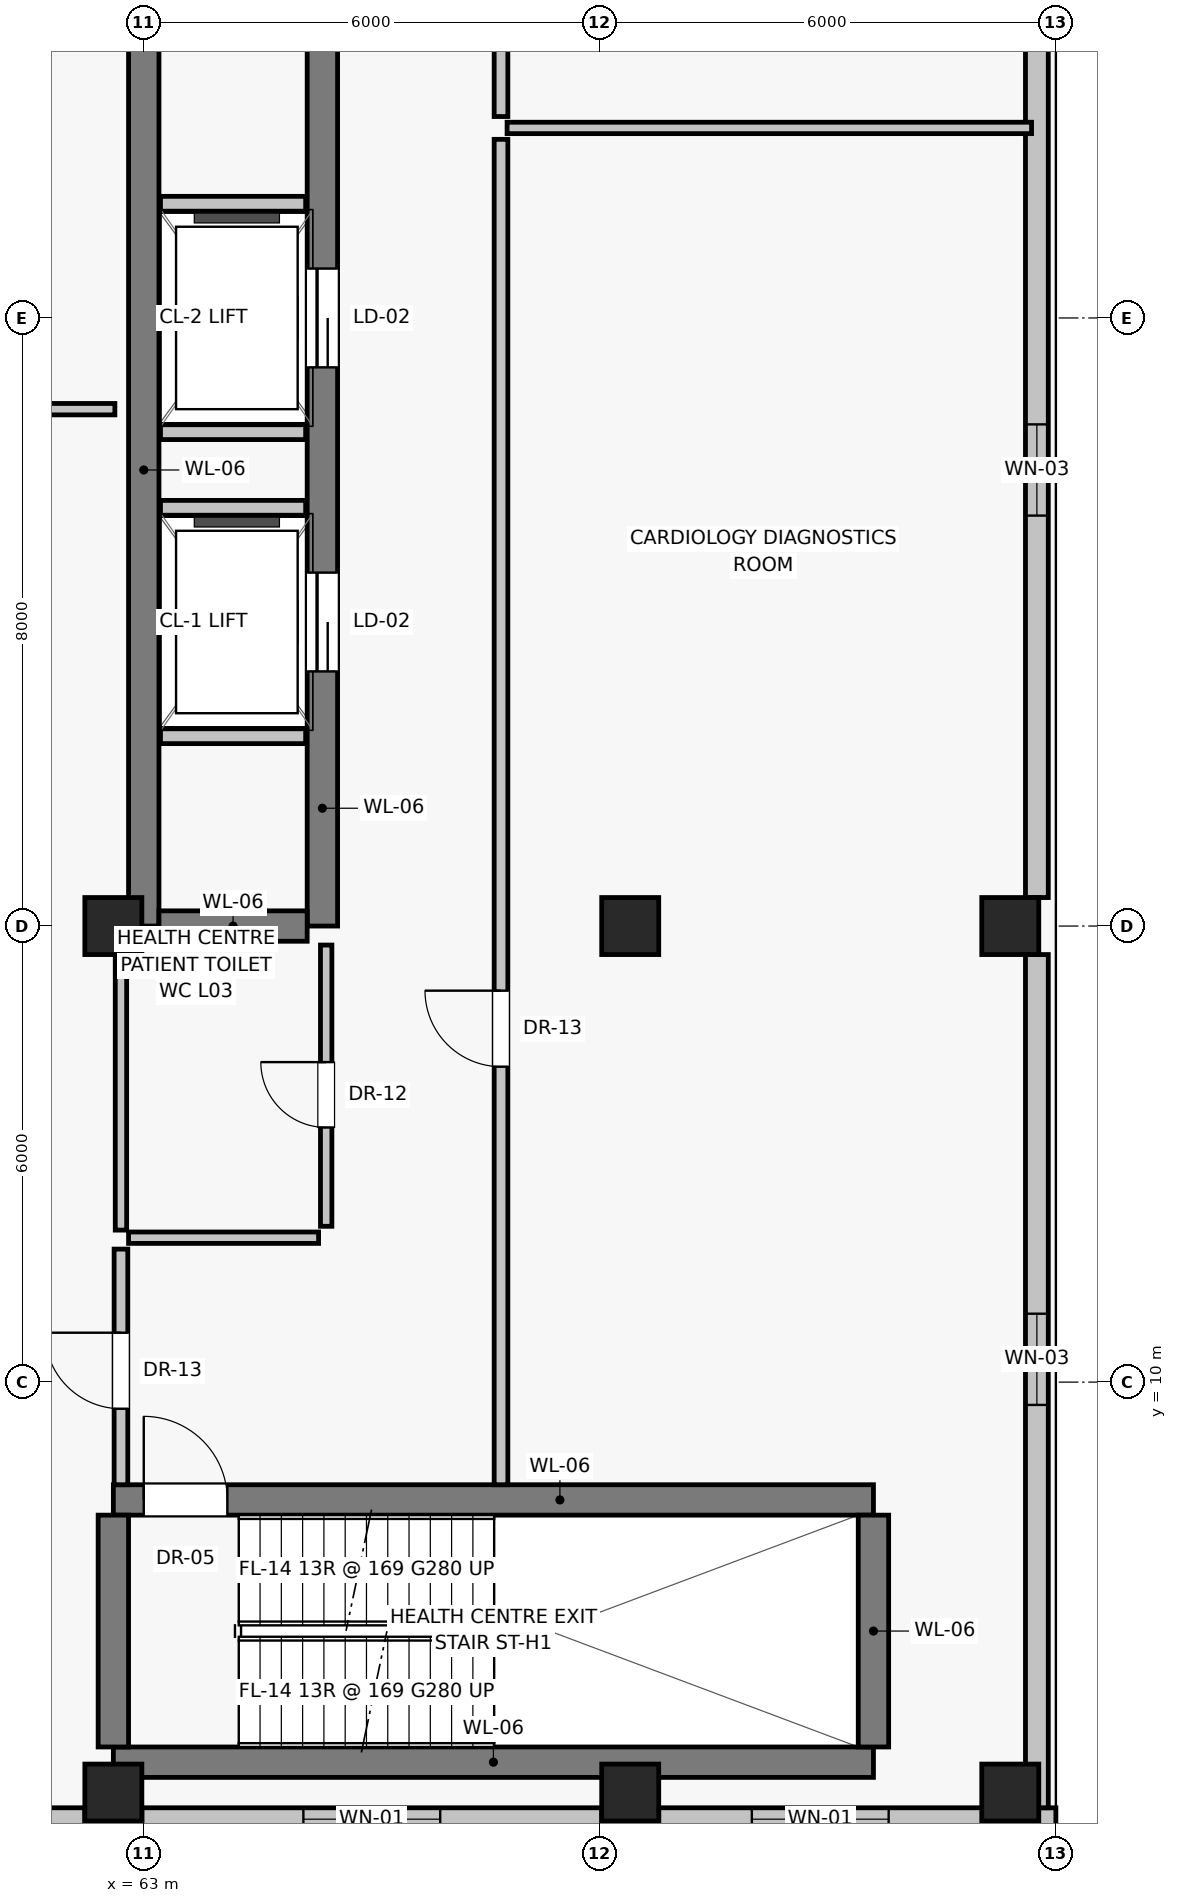
"""IFC4 building model, lengths in metres.
Left out: names, types, materials, properties, quantities, classifications, styles, units other than length and angle.
Written with IfcOpenShell. Run it as: python <this file> out.ifc"""

import sys

from ifc_helpers import new_model, si_unit, direction, frame, frame_2d, origin, origin_2d, place, context, subcontext, project, spatial, rectangle, extrude, source, transform, mapped, element, fill, save


model = new_model("IFC4")
c1 = context("Model", 3, precision=1e-05, world=origin(), true_north=direction((0.0, 1.0)))
c2 = subcontext(c1, "Body", "Model", "MODEL_VIEW")
j1 = project(units=[si_unit("LENGTHUNIT", "METRE"), si_unit("PLANEANGLEUNIT", "RADIAN")], contexts=[c1])
p1 = place(None, origin())
s1 = spatial("IfcSite", under=j1, at=p1, CompositionType="ELEMENT")
p2 = place(p1, origin())
s2 = spatial("IfcBuilding", under=s1, at=p2, CompositionType="ELEMENT")
p3 = place(p2, frame((0.0, 0.0, 14.0)))
s3 = spatial("IfcBuildingStorey", under=s2, at=p3, CompositionType="ELEMENT", Elevation=14.0)
for number, where, z_axis, x_axis in (
    (1, (62.6, 4.6, 0.0), (0.0, 0.0, 1.0), (1.0, 0.0, 0.0)),
    (2, (62.6, 16.0, 0.0), (0.0, 0.0, 1.0), (1.0, 0.0, 0.0)),
    (3, (69.4, 4.6, 0.0), (0.0, 0.0, 1.0), (1.0, 0.0, 0.0)),
    (4, (69.4, 16.0, 0.0), (0.0, 0.0, 1.0), (1.0, 0.0, 0.0)),
    (5, (74.4, 4.6, 0.0), (0.0, 0.0, 1.0), (1.0, 0.0, 0.0)),
    (6, (74.4, 16.0, 0.0), (0.0, 0.0, 1.0), (1.0, 0.0, 0.0)),
):
    element("IfcColumn", number, at=place(p3, frame(where, z_axis=z_axis, x_axis=x_axis)), inside=s3, PredefinedType="COLUMN", context=c2, shape_type="SweptSolid", body=[
        extrude(rectangle(XDim=0.75, YDim=0.75, at=origin_2d()), origin(), (0.0, 0.0, 1.0), 4.4),
    ])
p4 = place(p3, frame((57.0, 4.25, 0.0), z_axis=(0.0, 0.0, 1.0), x_axis=(1.0, 0.0, 0.0)))
e7 = element("IfcWall", 7, at=p4, inside=s3, PredefinedType="SOLIDWALL", context=c2, shape_type="SweptSolid", body=[
    extrude(rectangle(XDim=5.225, YDim=0.3, at=frame_2d((2.613, 0.0))), origin(), (0.0, 0.0, 1.0), 3.35),
])
p5 = place(p4, frame((2.2, 0.0, 0.85)))
e8 = element("IfcOpeningElement", 8, at=p5, cuts=e7, PredefinedType="OPENING", context=c2, shape_type="SweptSolid", body=[
    extrude(rectangle(XDim=1.8, YDim=1.65, at=frame_2d((0.9, 0.825))), frame((0.0, 0.16, 0.0), z_axis=(0.0, -1.0, 0.0), x_axis=(1.0, 0.0, 0.0)), (0.0, 0.0, 1.0), 0.32),
])
p6 = place(p3, frame((62.975, 4.25, 0.0), z_axis=(0.0, 0.0, 1.0), x_axis=(1.0, 0.0, 0.0)))
e9 = element("IfcWall", 9, at=p6, inside=s3, PredefinedType="SOLIDWALL", context=c2, shape_type="SweptSolid", body=[
    extrude(rectangle(XDim=6.05, YDim=0.3, at=frame_2d((3.025, 0.0))), origin(), (0.0, 0.0, 1.0), 3.35),
])
p7 = place(p6, frame((2.125, 0.0, 0.85)))
e10 = element("IfcOpeningElement", 10, at=p7, cuts=e9, PredefinedType="OPENING", context=c2, shape_type="SweptSolid", body=[
    extrude(rectangle(XDim=1.8, YDim=1.65, at=frame_2d((0.9, 0.825))), frame((0.0, 0.16, 0.0), z_axis=(0.0, -1.0, 0.0), x_axis=(1.0, 0.0, 0.0)), (0.0, 0.0, 1.0), 0.32),
])
p8 = place(p3, frame((69.775, 4.25, 0.0), z_axis=(0.0, 0.0, 1.0), x_axis=(1.0, 0.0, 0.0)))
e11 = element("IfcWall", 11, at=p8, inside=s3, PredefinedType="SOLIDWALL", context=c2, shape_type="SweptSolid", body=[
    extrude(rectangle(XDim=5.225, YDim=0.3, at=frame_2d((2.613, 0.0))), origin(), (0.0, 0.0, 1.0), 3.35),
])
p9 = place(p8, frame((1.225, 0.0, 0.85)))
e12 = element("IfcOpeningElement", 12, at=p9, cuts=e11, PredefinedType="OPENING", context=c2, shape_type="SweptSolid", body=[
    extrude(rectangle(XDim=1.8, YDim=1.65, at=frame_2d((0.9, 0.825))), frame((0.0, 0.16, 0.0), z_axis=(0.0, -1.0, 0.0), x_axis=(1.0, 0.0, 0.0)), (0.0, 0.0, 1.0), 0.32),
])
p10 = place(p3, frame((74.75, 4.4, 0.0), z_axis=(0.0, 0.0, 1.0), x_axis=(0.0, 1.0, 0.0)))
e13 = element("IfcWall", 13, at=p10, inside=s3, PredefinedType="SOLIDWALL", context=c2, shape_type="SweptSolid", body=[
    extrude(rectangle(XDim=11.225, YDim=0.3, at=frame_2d((5.613, 0.0))), origin(), (0.0, 0.0, 1.0), 3.35),
])
p11 = place(p10, frame((5.3, 0.0, 0.95)))
e14 = element("IfcOpeningElement", 14, at=p11, cuts=e13, PredefinedType="OPENING", context=c2, shape_type="SweptSolid", body=[
    extrude(rectangle(XDim=1.2, YDim=1.5, at=frame_2d((0.6, 0.75))), frame((0.0, 0.16, 0.0), z_axis=(0.0, -1.0, 0.0), x_axis=(1.0, 0.0, 0.0)), (0.0, 0.0, 1.0), 0.32),
])
p12 = place(p3, frame((74.75, 16.375, 0.0), z_axis=(0.0, 0.0, 1.0), x_axis=(0.0, 1.0, 0.0)))
e15 = element("IfcWall", 15, at=p12, inside=s3, PredefinedType="SOLIDWALL", context=c2, shape_type="SweptSolid", body=[
    extrude(rectangle(XDim=11.25, YDim=0.3, at=frame_2d((5.625, 0.0))), origin(), (0.0, 0.0, 1.0), 3.35),
])
p13 = place(p12, frame((5.025, 0.0, 0.95)))
e16 = element("IfcOpeningElement", 16, at=p13, cuts=e15, PredefinedType="OPENING", context=c2, shape_type="SweptSolid", body=[
    extrude(rectangle(XDim=1.2, YDim=1.5, at=frame_2d((0.6, 0.75))), frame((0.0, 0.16, 0.0), z_axis=(0.0, -1.0, 0.0), x_axis=(1.0, 0.0, 0.0)), (0.0, 0.0, 1.0), 0.32),
])
p14 = place(p3, frame((63.0, 16.0, 0.0), z_axis=(0.0, 0.0, 1.0), x_axis=(0.0, 1.0, 0.0)))
e17 = element("IfcWall", 17, at=p14, inside=s3, PredefinedType="SHEAR", context=c2, shape_type="SweptSolid", body=[
    extrude(rectangle(XDim=12.0, YDim=0.4, at=frame_2d((6.0, 0.0))), origin(), (0.0, 0.0, 1.0), 4.1),
])
p15 = place(p3, frame((65.35, 16.0, 0.0), z_axis=(0.0, 0.0, 1.0), x_axis=(0.0, 1.0, 0.0)))
e18 = element("IfcWall", 18, at=p15, inside=s3, PredefinedType="SHEAR", context=c2, shape_type="SweptSolid", body=[
    extrude(rectangle(XDim=12.0, YDim=0.4, at=frame_2d((6.0, 0.0))), origin(), (0.0, 0.0, 1.0), 4.1),
])
p16 = place(p15, frame((3.35, 0.0, 0.0)))
e19 = element("IfcOpeningElement", 19, at=p16, cuts=e18, PredefinedType="OPENING", context=c2, shape_type="SweptSolid", body=[
    extrude(rectangle(XDim=1.3, YDim=2.25, at=frame_2d((0.65, 1.125))), frame((0.0, 0.21, 0.0), z_axis=(0.0, -1.0, 0.0), x_axis=(1.0, 0.0, 0.0)), (0.0, 0.0, 1.0), 0.42),
])
p17 = place(p15, frame((7.35, 0.0, 0.0)))
e20 = element("IfcOpeningElement", 20, at=p17, cuts=e18, PredefinedType="OPENING", context=c2, shape_type="SweptSolid", body=[
    extrude(rectangle(XDim=1.3, YDim=2.25, at=frame_2d((0.65, 1.125))), frame((0.0, 0.21, 0.0), z_axis=(0.0, -1.0, 0.0), x_axis=(1.0, 0.0, 0.0)), (0.0, 0.0, 1.0), 0.42),
])
p18 = place(p3, frame((63.2, 16.0, 0.0), z_axis=(0.0, 0.0, 1.0), x_axis=(1.0, 0.0, 0.0)))
e21 = element("IfcWall", 21, at=p18, inside=s3, PredefinedType="SHEAR", context=c2, shape_type="SweptSolid", body=[
    extrude(rectangle(XDim=1.95, YDim=0.4, at=frame_2d((0.975, 0.0))), origin(), (0.0, 0.0, 1.0), 4.1),
])
for number, where, z_axis, x_axis in (
    (22, (63.22, 18.5, 0.0), (0.0, 0.0, 1.0), (1.0, 0.0, 0.0)),
    (23, (63.22, 21.5, 0.0), (0.0, 0.0, 1.0), (1.0, 0.0, 0.0)),
    (24, (63.22, 22.5, 0.0), (0.0, 0.0, 1.0), (1.0, 0.0, 0.0)),
    (25, (63.22, 25.5, 0.0), (0.0, 0.0, 1.0), (1.0, 0.0, 0.0)),
):
    element("IfcWall", number, at=place(p3, frame(where, z_axis=z_axis, x_axis=x_axis)), inside=s3, PredefinedType="SOLIDWALL", context=c2, shape_type="SweptSolid", body=[
        extrude(rectangle(XDim=1.91, YDim=0.2, at=frame_2d((0.955, 0.0))), origin(), (0.0, 0.0, 1.0), 4.1),
    ])
p19 = place(p3, frame((62.6, 5.0, 0.0), z_axis=(0.0, 0.0, 1.0), x_axis=(1.0, 0.0, 0.0)))
e26 = element("IfcWall", 26, at=p19, inside=s3, PredefinedType="SHEAR", context=c2, shape_type="SweptSolid", body=[
    extrude(rectangle(XDim=10.0, YDim=0.4, at=frame_2d((5.0, 0.0))), origin(), (0.0, 0.0, 1.0), 4.1),
])
p20 = place(p3, frame((62.6, 8.45, 0.0), z_axis=(0.0, 0.0, 1.0), x_axis=(1.0, 0.0, 0.0)))
e27 = element("IfcWall", 27, at=p20, inside=s3, PredefinedType="SHEAR", context=c2, shape_type="SweptSolid", body=[
    extrude(rectangle(XDim=10.0, YDim=0.4, at=frame_2d((5.0, 0.0))), origin(), (0.0, 0.0, 1.0), 4.1),
])
p21 = place(p20, frame((0.4, 0.0, 0.0)))
e28 = element("IfcOpeningElement", 28, at=p21, cuts=e27, PredefinedType="OPENING", context=c2, shape_type="SweptSolid", body=[
    extrude(rectangle(XDim=1.1, YDim=2.03, at=frame_2d((0.55, 1.015))), frame((0.0, 0.21, 0.0), z_axis=(0.0, -1.0, 0.0), x_axis=(1.0, 0.0, 0.0)), (0.0, 0.0, 1.0), 0.42),
])
for number, where, z_axis, x_axis in (
    (29, (62.6, 5.2, 0.0), (0.0, 0.0, 1.0), (0.0, 1.0, 0.0)),
    (30, (72.6, 5.2, 0.0), (0.0, 0.0, 1.0), (0.0, 1.0, 0.0)),
):
    element("IfcWall", number, at=place(p3, frame(where, z_axis=z_axis, x_axis=x_axis)), inside=s3, PredefinedType="SHEAR", context=c2, shape_type="SweptSolid", body=[
        extrude(rectangle(XDim=3.05, YDim=0.4, at=frame_2d((1.525, 0.0))), origin(), (0.0, 0.0, 1.0), 4.1),
    ])
p22 = place(p3, frame((62.8, 11.9, 0.0), z_axis=(0.0, 0.0, 1.0), x_axis=(1.0, 0.0, 0.0)))
e31 = element("IfcWall", 31, at=p22, inside=s3, PredefinedType="PARTITIONING", context=c2, shape_type="SweptSolid", body=[
    extrude(rectangle(XDim=2.5, YDim=0.15, at=frame_2d((1.25, 0.0))), origin(), (0.0, 0.0, 1.0), 4.1),
])
p23 = place(p3, frame((62.7, 12.0, 0.0), z_axis=(0.0, 0.0, 1.0), x_axis=(0.0, 1.0, 0.0)))
e32 = element("IfcWall", 32, at=p23, inside=s3, PredefinedType="PARTITIONING", context=c2, shape_type="SweptSolid", body=[
    extrude(rectangle(XDim=3.8, YDim=0.15, at=frame_2d((1.9, 0.0))), origin(), (0.0, 0.0, 1.0), 3.5),
])
p24 = place(p3, frame((65.4, 12.05, 0.0), z_axis=(0.0, 0.0, 1.0), x_axis=(0.0, 1.0, 0.0)))
e33 = element("IfcWall", 33, at=p24, inside=s3, PredefinedType="PARTITIONING", context=c2, shape_type="SweptSolid", body=[
    extrude(rectangle(XDim=3.7, YDim=0.15, at=frame_2d((1.85, 0.0))), origin(), (0.0, 0.0, 1.0), 4.1),
])
p25 = place(p24, frame((1.3, 0.0, 0.0)))
e34 = element("IfcOpeningElement", 34, at=p25, cuts=e33, PredefinedType="OPENING", context=c2, shape_type="SweptSolid", body=[
    extrude(rectangle(XDim=0.86, YDim=2.01, at=frame_2d((0.43, 1.005))), frame((0.0, 0.085, 0.0), z_axis=(0.0, -1.0, 0.0), x_axis=(1.0, 0.0, 0.0)), (0.0, 0.0, 1.0), 0.17),
])
p26 = place(p3, frame((62.7, 8.65, 0.0), z_axis=(0.0, 0.0, 1.0), x_axis=(0.0, 1.0, 0.0)))
e35 = element("IfcWall", 35, at=p26, inside=s3, PredefinedType="PARTITIONING", context=c2, shape_type="SweptSolid", body=[
    extrude(rectangle(XDim=3.1, YDim=0.18, at=frame_2d((1.55, 0.0))), origin(), (0.0, 0.0, 1.0), 3.5),
])
p27 = place(p26, frame((1.0, 0.0, 0.0)))
e36 = element("IfcOpeningElement", 36, at=p27, cuts=e35, PredefinedType="OPENING", context=c2, shape_type="SweptSolid", body=[
    extrude(rectangle(XDim=1.0, YDim=2.01, at=frame_2d((0.5, 1.005))), frame((0.0, 0.1, 0.0), z_axis=(0.0, -1.0, 0.0), x_axis=(1.0, 0.0, 0.0)), (0.0, 0.0, 1.0), 0.2),
])
p28 = place(p3, frame((57.32, 22.8, 0.0), z_axis=(0.0, 0.0, 1.0), x_axis=(1.0, 0.0, 0.0)))
e37 = element("IfcWall", 37, at=p28, inside=s3, PredefinedType="PARTITIONING", context=c2, shape_type="SweptSolid", body=[
    extrude(rectangle(XDim=5.3, YDim=0.15, at=frame_2d((2.65, 0.0))), origin(), (0.0, 0.0, 1.0), 4.1),
])
p29 = place(p3, frame((67.7, 8.65, 0.0), z_axis=(0.0, 0.0, 1.0), x_axis=(0.0, 1.0, 0.0)))
e38 = element("IfcWall", 38, at=p29, inside=s3, PredefinedType="PARTITIONING", context=c2, shape_type="SweptSolid", body=[
    extrude(rectangle(XDim=17.7, YDim=0.18, at=frame_2d((8.85, 0.0))), origin(), (0.0, 0.0, 1.0), 4.1),
])
p30 = place(p29, frame((5.5, 0.0, 0.0)))
e39 = element("IfcOpeningElement", 39, at=p30, cuts=e38, PredefinedType="OPENING", context=c2, shape_type="SweptSolid", body=[
    extrude(rectangle(XDim=1.0, YDim=2.01, at=frame_2d((0.5, 1.005))), frame((0.0, 0.1, 0.0), z_axis=(0.0, -1.0, 0.0), x_axis=(1.0, 0.0, 0.0)), (0.0, 0.0, 1.0), 0.2),
])
p31 = place(p3, frame((67.7, 26.65, 0.0), z_axis=(0.0, 0.0, 1.0), x_axis=(0.0, 1.0, 0.0)))
e40 = element("IfcWall", 40, at=p31, inside=s3, PredefinedType="PARTITIONING", context=c2, shape_type="SweptSolid", body=[
    extrude(rectangle(XDim=12.7, YDim=0.18, at=frame_2d((6.35, 0.0))), origin(), (0.0, 0.0, 1.0), 4.1),
])
p32 = place(p31, frame((5.5, 0.0, 0.0)))
e41 = element("IfcOpeningElement", 41, at=p32, cuts=e40, PredefinedType="OPENING", context=c2, shape_type="SweptSolid", body=[
    extrude(rectangle(XDim=1.0, YDim=2.01, at=frame_2d((0.5, 1.005))), frame((0.0, 0.1, 0.0), z_axis=(0.0, -1.0, 0.0), x_axis=(1.0, 0.0, 0.0)), (0.0, 0.0, 1.0), 0.2),
])
p33 = place(p3, frame((67.78, 26.5, 0.0), z_axis=(0.0, 0.0, 1.0), x_axis=(1.0, 0.0, 0.0)))
e42 = element("IfcWall", 42, at=p33, inside=s3, PredefinedType="PARTITIONING", context=c2, shape_type="SweptSolid", body=[
    extrude(rectangle(XDim=6.9, YDim=0.15, at=frame_2d((3.45, 0.0))), origin(), (0.0, 0.0, 1.0), 4.1),
])
m1 = source(origin(), c2, "Body", "SweptSolid", [
    extrude(rectangle(XDim=1.8, YDim=1.65, at=frame_2d((0.9, 0.825))), frame((0.0, 0.03, 0.0), z_axis=(0.0, -1.0, 0.0), x_axis=(1.0, 0.0, 0.0)), (0.0, 0.0, 1.0), 0.06),
])
p34 = place(p7, origin())
e43 = element("IfcWindow", 43, at=p34, inside=s3, PartitioningType="DOUBLE_PANEL_VERTICAL", PredefinedType="WINDOW", context=c2, shape_type="MappedRepresentation", body=[
    mapped(m1, transform((0.0, 0.0, 0.0), scale=1.0)),
])
fill(e10, e43)
p35 = place(p9, origin())
e44 = element("IfcWindow", 44, at=p35, inside=s3, PartitioningType="DOUBLE_PANEL_VERTICAL", PredefinedType="WINDOW", context=c2, shape_type="MappedRepresentation", body=[
    mapped(m1, transform((0.0, 0.0, 0.0), scale=1.0)),
])
fill(e12, e44)
m2 = source(origin(), c2, "Body", "SweptSolid", [
    extrude(rectangle(XDim=1.2, YDim=1.5, at=frame_2d((0.6, 0.75))), frame((0.0, 0.03, 0.0), z_axis=(0.0, -1.0, 0.0), x_axis=(1.0, 0.0, 0.0)), (0.0, 0.0, 1.0), 0.06),
])
p36 = place(p11, origin())
e45 = element("IfcWindow", 45, at=p36, inside=s3, PartitioningType="SINGLE_PANEL", PredefinedType="WINDOW", context=c2, shape_type="MappedRepresentation", body=[
    mapped(m2, transform((0.0, 0.0, 0.0), scale=1.0)),
])
fill(e14, e45)
p37 = place(p13, origin())
e46 = element("IfcWindow", 46, at=p37, inside=s3, PartitioningType="SINGLE_PANEL", PredefinedType="WINDOW", context=c2, shape_type="MappedRepresentation", body=[
    mapped(m2, transform((0.0, 0.0, 0.0), scale=1.0)),
])
fill(e16, e46)
m3 = source(origin(), c2, "Body", "SweptSolid", [
    extrude(rectangle(XDim=1.3, YDim=2.25, at=frame_2d((0.65, 1.125))), frame((0.0, 0.025, 0.0), z_axis=(0.0, -1.0, 0.0), x_axis=(1.0, 0.0, 0.0)), (0.0, 0.0, 1.0), 0.05),
])
p38 = place(p16, origin())
e47 = element("IfcDoor", 47, at=p38, inside=s3, OperationType="SLIDING_TO_LEFT", PredefinedType="DOOR", context=c2, shape_type="MappedRepresentation", body=[
    mapped(m3, transform((0.0, 0.0, 0.0), scale=1.0)),
])
fill(e19, e47)
p39 = place(p17, origin())
e48 = element("IfcDoor", 48, at=p39, inside=s3, OperationType="SLIDING_TO_LEFT", PredefinedType="DOOR", context=c2, shape_type="MappedRepresentation", body=[
    mapped(m3, transform((0.0, 0.0, 0.0), scale=1.0)),
])
fill(e20, e48)
m4 = source(origin(), c2, "Body", "SweptSolid", [
    extrude(rectangle(XDim=1.1, YDim=2.03, at=frame_2d((0.55, 1.015))), frame((0.0, 0.025, 0.0), z_axis=(0.0, -1.0, 0.0), x_axis=(1.0, 0.0, 0.0)), (0.0, 0.0, 1.0), 0.05),
])
p40 = place(p21, origin())
e49 = element("IfcDoor", 49, at=p40, inside=s3, OperationType="SINGLE_SWING_LEFT", PredefinedType="DOOR", context=c2, shape_type="MappedRepresentation", body=[
    mapped(m4, transform((0.0, 0.0, 0.0), scale=1.0)),
])
fill(e28, e49)
m5 = source(origin(), c2, "Body", "SweptSolid", [
    extrude(rectangle(XDim=0.86, YDim=2.01, at=frame_2d((0.43, 1.005))), frame((0.0, 0.025, 0.0), z_axis=(0.0, -1.0, 0.0), x_axis=(1.0, 0.0, 0.0)), (0.0, 0.0, 1.0), 0.05),
])
p41 = place(p25, origin())
e50 = element("IfcDoor", 50, at=p41, inside=s3, OperationType="SINGLE_SWING_RIGHT", PredefinedType="DOOR", context=c2, shape_type="MappedRepresentation", body=[
    mapped(m5, transform((0.0, 0.0, 0.0), scale=1.0)),
])
fill(e34, e50)
m6 = source(origin(), c2, "Body", "SweptSolid", [
    extrude(rectangle(XDim=1.0, YDim=2.01, at=frame_2d((0.5, 1.005))), frame((0.0, 0.025, 0.0), z_axis=(0.0, -1.0, 0.0), x_axis=(1.0, 0.0, 0.0)), (0.0, 0.0, 1.0), 0.05),
])
p42 = place(p27, origin())
e51 = element("IfcDoor", 51, at=p42, inside=s3, OperationType="SINGLE_SWING_RIGHT", PredefinedType="DOOR", context=c2, shape_type="MappedRepresentation", body=[
    mapped(m6, transform((0.0, 0.0, 0.0), scale=1.0)),
])
fill(e36, e51)
p43 = place(p30, origin())
e52 = element("IfcDoor", 52, at=p43, inside=s3, OperationType="SINGLE_SWING_RIGHT", PredefinedType="DOOR", context=c2, shape_type="MappedRepresentation", body=[
    mapped(m6, transform((0.0, 0.0, 0.0), scale=1.0)),
])
fill(e39, e52)
save(model, sys.argv[1])
